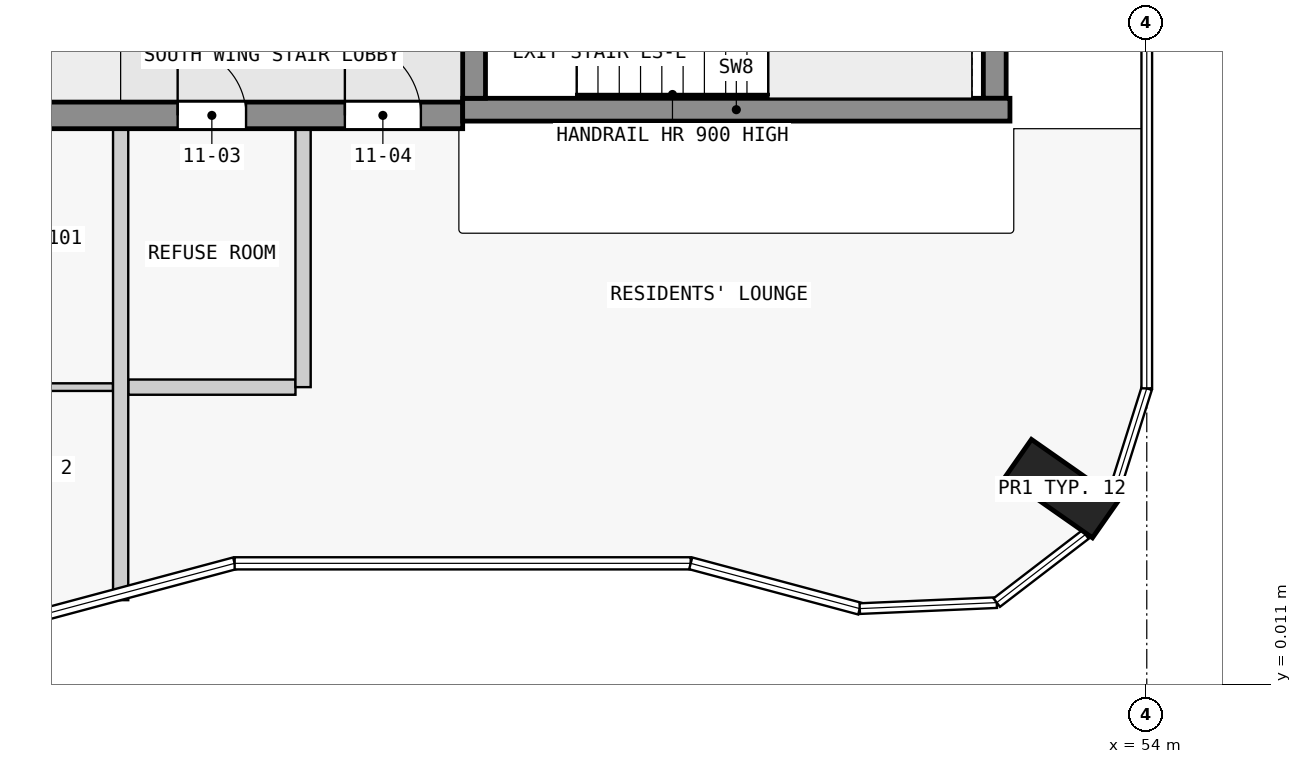
"""IFC4 building model, lengths in metres.
Left out: names, types, materials, properties, quantities, classifications, styles, units other than length and angle.
Written with IfcOpenShell. Run it as: python <this file> out.ifc"""

import sys

from ifc_helpers import new_model, si_unit, direction, frame, frame_2d, origin, origin_2d, place, context, subcontext, project, spatial, rectangle, extrude, element, fill, save


model = new_model("IFC4")
c1 = context("Model", 3, precision=1e-05, world=origin(), true_north=direction((0.0, 1.0)))
c2 = subcontext(c1, "Body", "Model", "MODEL_VIEW")
j1 = project(units=[si_unit("LENGTHUNIT", "METRE"), si_unit("PLANEANGLEUNIT", "RADIAN")], contexts=[c1])
p1 = place(None, origin())
s1 = spatial("IfcSite", under=j1, at=p1, CompositionType="ELEMENT")
p2 = place(p1, origin())
s2 = spatial("IfcBuilding", under=s1, at=p2, CompositionType="ELEMENT")
p3 = place(p2, frame((0.0, 0.0, 47.8)))
s3 = spatial("IfcBuildingStorey", under=s2, at=p3, CompositionType="ELEMENT", Elevation=47.8)
p4 = place(p3, frame((52.884, 2.59, 0.0), z_axis=(0.0, 0.0, 1.0), x_axis=(0.573542637991, 0.819175709117, 0.0)))
e1 = element("IfcColumn", 1, at=p4, inside=s3, PredefinedType="COLUMN", context=c2, shape_type="SweptSolid", body=[
    extrude(rectangle(XDim=0.6, YDim=1.4, at=origin_2d()), origin(), (0.0, 0.0, 1.0), 3.5),
])
p5 = place(p3, frame((45.15, 7.725, 0.0), z_axis=(0.0, 0.0, 1.0), x_axis=(0.0, 1.0, 0.0)))
e2 = element("IfcWall", 2, at=p5, inside=s3, PredefinedType="SHEAR", context=c2, shape_type="SweptSolid", body=[
    extrude(rectangle(XDim=2.55, YDim=0.3, at=frame_2d((1.275, 0.0))), origin(), (0.0, 0.0, 1.0), 3.5),
])
p6 = place(p5, frame((0.725, 0.0, 0.0)))
e3 = element("IfcOpeningElement", 3, at=p6, cuts=e2, PredefinedType="OPENING", context=c2, shape_type="SweptSolid", body=[
    extrude(rectangle(XDim=1.1, YDim=2.1, at=frame_2d((0.55, 1.05))), frame((0.0, 0.16, 0.0), z_axis=(0.0, -1.0, 0.0), x_axis=(1.0, 0.0, 0.0)), (0.0, 0.0, 1.0), 0.32),
])
p7 = place(p3, frame((52.0, 7.725, 0.0), z_axis=(0.0, 0.0, 1.0), x_axis=(0.0, 1.0, 0.0)))
e4 = element("IfcWall", 4, at=p7, inside=s3, PredefinedType="SHEAR", context=c2, shape_type="SweptSolid", body=[
    extrude(rectangle(XDim=2.55, YDim=0.3, at=frame_2d((1.275, 0.0))), origin(), (0.0, 0.0, 1.0), 3.5),
])
p8 = place(p3, frame((45.0, 7.575, 0.0), z_axis=(0.0, 0.0, 1.0), x_axis=(1.0, 0.0, 0.0)))
e5 = element("IfcWall", 5, at=p8, inside=s3, PredefinedType="SHEAR", context=c2, shape_type="SweptSolid", body=[
    extrude(rectangle(XDim=7.2, YDim=0.3, at=frame_2d((3.6, 0.0))), origin(), (0.0, 0.0, 1.0), 3.5),
])
p9 = place(p3, frame((22.5, 7.5, 0.0), z_axis=(0.0, 0.0, 1.0), x_axis=(1.0, 0.0, 0.0)))
e6 = element("IfcWall", 6, at=p9, inside=s3, PredefinedType="SHEAR", context=c2, shape_type="SweptSolid", body=[
    extrude(rectangle(XDim=22.5, YDim=0.35, at=frame_2d((11.25, 0.0))), origin(), (0.0, 0.0, 1.0), 3.25),
])
p10 = place(p9, frame((1.75, 0.0, 0.0)))
e7 = element("IfcOpeningElement", 7, at=p10, cuts=e6, PredefinedType="OPENING", context=c2, shape_type="SweptSolid", body=[
    extrude(rectangle(XDim=1.0, YDim=2.1, at=frame_2d((0.5, 1.05))), frame((0.0, 0.185, 0.0), z_axis=(0.0, -1.0, 0.0), x_axis=(1.0, 0.0, 0.0)), (0.0, 0.0, 1.0), 0.37),
])
p11 = place(p9, frame((10.15, 0.0, 0.0)))
e8 = element("IfcOpeningElement", 8, at=p11, cuts=e6, PredefinedType="OPENING", context=c2, shape_type="SweptSolid", body=[
    extrude(rectangle(XDim=1.0, YDim=2.1, at=frame_2d((0.5, 1.05))), frame((0.0, 0.185, 0.0), z_axis=(0.0, -1.0, 0.0), x_axis=(1.0, 0.0, 0.0)), (0.0, 0.0, 1.0), 0.37),
])
p12 = place(p9, frame((18.75, 0.0, 0.0)))
e9 = element("IfcOpeningElement", 9, at=p12, cuts=e6, PredefinedType="OPENING", context=c2, shape_type="SweptSolid", body=[
    extrude(rectangle(XDim=0.9, YDim=2.1, at=frame_2d((0.45, 1.05))), frame((0.0, 0.185, 0.0), z_axis=(0.0, -1.0, 0.0), x_axis=(1.0, 0.0, 0.0)), (0.0, 0.0, 1.0), 0.37),
])
p13 = place(p9, frame((20.95, 0.0, 0.0)))
e10 = element("IfcOpeningElement", 10, at=p13, cuts=e6, PredefinedType="OPENING", context=c2, shape_type="SweptSolid", body=[
    extrude(rectangle(XDim=1.0, YDim=2.1, at=frame_2d((0.5, 1.05))), frame((0.0, 0.185, 0.0), z_axis=(0.0, -1.0, 0.0), x_axis=(1.0, 0.0, 0.0)), (0.0, 0.0, 1.0), 0.37),
])
p14 = place(p3, frame((37.45, 3.925, 0.0), z_axis=(0.0, 0.0, 1.0), x_axis=(1.0, 0.0, 0.0)))
e11 = element("IfcWall", 11, at=p14, inside=s3, PredefinedType="PARTITIONING", context=c2, shape_type="SweptSolid", body=[
    extrude(rectangle(XDim=2.95, YDim=0.1, at=frame_2d((1.475, 0.0))), origin(), (0.0, 0.0, 1.0), 3.25),
])
p15 = place(p3, frame((40.6, 3.925, 0.0), z_axis=(0.0, 0.0, 1.0), x_axis=(1.0, 0.0, 0.0)))
e12 = element("IfcWall", 12, at=p15, inside=s3, PredefinedType="PARTITIONING", context=c2, shape_type="SweptSolid", body=[
    extrude(rectangle(XDim=2.2, YDim=0.2, at=frame_2d((1.1, 0.0))), origin(), (0.0, 0.0, 1.0), 3.25),
])
p16 = place(p3, frame((40.5, 1.122, 0.0), z_axis=(0.0, 0.0, 1.0), x_axis=(0.0, 1.0, 0.0)))
e13 = element("IfcWall", 13, at=p16, inside=s3, PredefinedType="PARTITIONING", context=c2, shape_type="SweptSolid", body=[
    extrude(rectangle(XDim=6.203, YDim=0.2, at=frame_2d((3.101, 0.0))), origin(), (0.0, 0.0, 1.0), 3.25),
])
p17 = place(p3, frame((42.9, 3.925, 0.0), z_axis=(0.0, 0.0, 1.0), x_axis=(0.0, 1.0, 0.0)))
e14 = element("IfcWall", 14, at=p17, inside=s3, PredefinedType="PARTITIONING", context=c2, shape_type="SweptSolid", body=[
    extrude(rectangle(XDim=3.4, YDim=0.2, at=frame_2d((1.7, 0.0))), origin(), (0.0, 0.0, 1.0), 3.25),
])
p18 = place(p12, origin())
e15 = element("IfcDoor", 15, at=p18, inside=s3, OperationType="SINGLE_SWING_RIGHT", PredefinedType="DOOR", context=c2, shape_type="SweptSolid", body=[
    extrude(rectangle(XDim=0.9, YDim=2.1, at=frame_2d((0.45, 1.05))), frame((0.0, 0.025, 0.0), z_axis=(0.0, -1.0, 0.0), x_axis=(1.0, 0.0, 0.0)), (0.0, 0.0, 1.0), 0.05),
])
fill(e9, e15)
p19 = place(p13, origin())
e16 = element("IfcDoor", 16, at=p19, inside=s3, OperationType="SINGLE_SWING_RIGHT", PredefinedType="DOOR", context=c2, shape_type="SweptSolid", body=[
    extrude(rectangle(XDim=1.0, YDim=2.1, at=frame_2d((0.5, 1.05))), frame((0.0, 0.025, 0.0), z_axis=(0.0, -1.0, 0.0), x_axis=(1.0, 0.0, 0.0)), (0.0, 0.0, 1.0), 0.05),
])
fill(e10, e16)
save(model, sys.argv[1])
